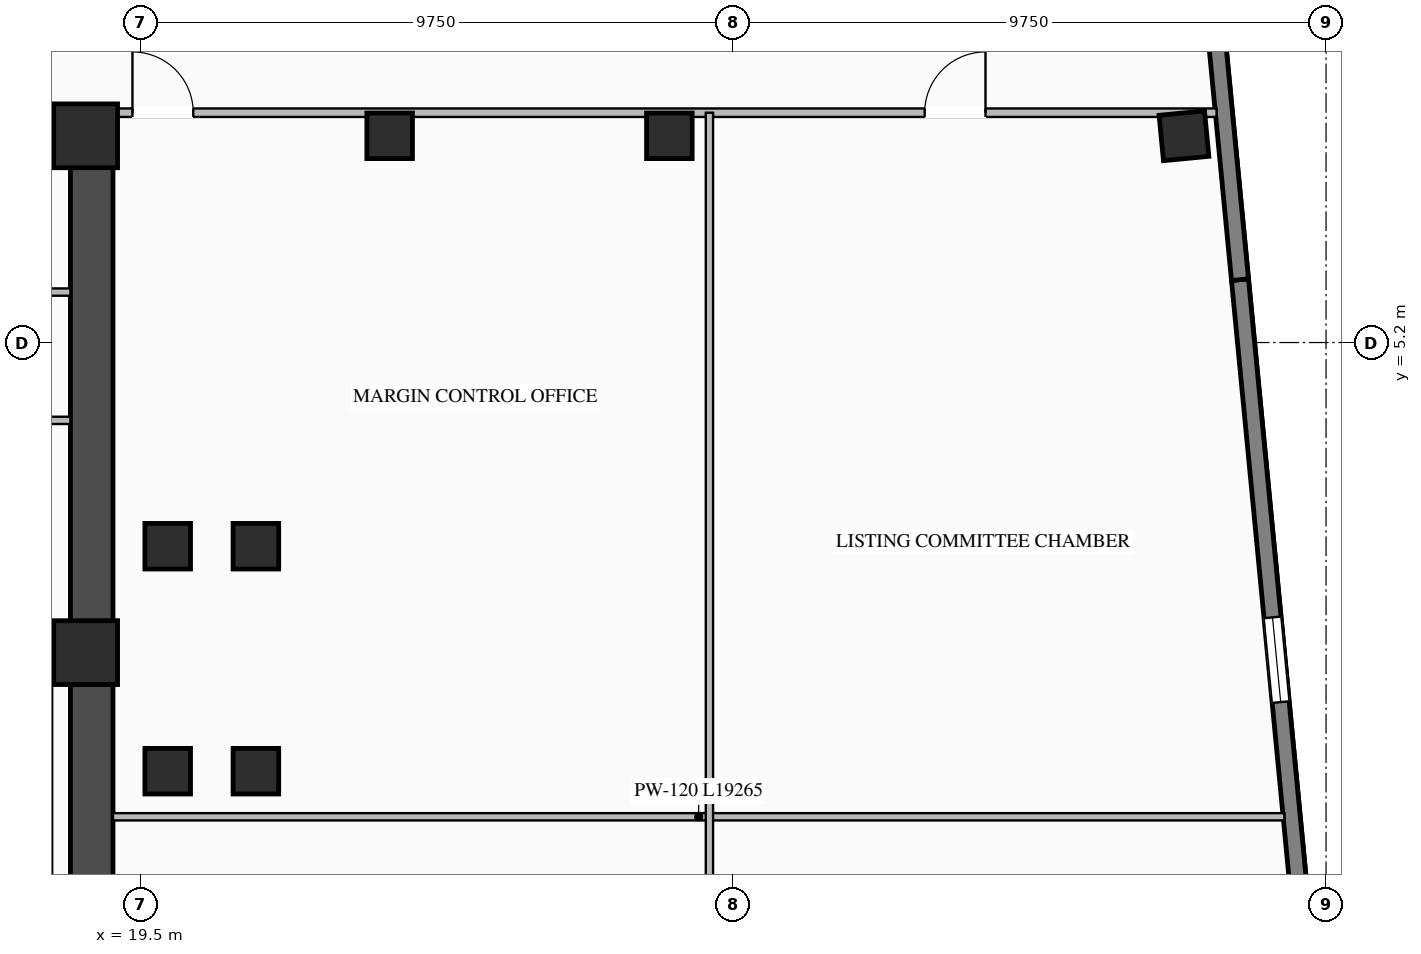
"""IFC4 building model, lengths in metres.
Left out: names, types, materials, properties, quantities, classifications, styles, units other than length and angle.
Written with IfcOpenShell. Run it as: python <this file> out.ifc"""

import sys

from ifc_helpers import new_model, si_unit, direction, frame, frame_2d, origin, origin_2d, place, context, subcontext, project, spatial, rectangle, i_section, extrude, element, fill, save


model = new_model("IFC4")
c1 = context("Model", 3, precision=1e-05, world=origin(), true_north=direction((0.0, 1.0)))
c2 = subcontext(c1, "Body", "Model", "MODEL_VIEW")
j1 = project(units=[si_unit("LENGTHUNIT", "METRE"), si_unit("PLANEANGLEUNIT", "RADIAN")], contexts=[c1])
p1 = place(None, origin())
s1 = spatial("IfcSite", under=j1, at=p1, CompositionType="ELEMENT")
p2 = place(p1, origin())
s2 = spatial("IfcBuilding", under=s1, at=p2, CompositionType="ELEMENT")
p3 = place(p2, frame((0.0, 0.0, 101.8)))
s3 = spatial("IfcBuildingStorey", under=s2, at=p3, CompositionType="ELEMENT", Elevation=101.8)
p4 = place(p3, frame((8.8, 8.7, 0.0), z_axis=(0.0, 0.0, 1.0), x_axis=(1.0, 0.0, 0.0)))
e1 = element("IfcWall", 1, at=p4, inside=s3, PredefinedType="SHEAR", context=c2, shape_type="SweptSolid", body=[
    extrude(rectangle(XDim=10.25, YDim=0.7, at=frame_2d((5.125, 0.0))), origin(), (0.0, 0.0, 1.0), 3.27),
])
p5 = place(p4, frame((3.25, 0.0, 0.0)))
e2 = element("IfcOpeningElement", 2, at=p5, cuts=e1, PredefinedType="OPENING", context=c2, shape_type="SweptSolid", body=[
    extrude(rectangle(XDim=1.4, YDim=2.05, at=frame_2d((0.7, 1.025))), frame((0.0, 0.36, 0.0), z_axis=(0.0, -1.0, 0.0), x_axis=(1.0, 0.0, 0.0)), (0.0, 0.0, 1.0), 0.72),
])
p6 = place(p3, frame((18.7, -8.35, 0.0), z_axis=(0.0, 0.0, 1.0), x_axis=(0.0, 1.0, 0.0)))
e3 = element("IfcWall", 3, at=p6, inside=s3, PredefinedType="SHEAR", context=c2, shape_type="SweptSolid", body=[
    extrude(rectangle(XDim=16.7, YDim=0.7, at=frame_2d((8.35, 0.0))), origin(), (0.0, 0.0, 1.0), 3.27),
])
for number, where, z_axis, x_axis in (
    (4, (18.6, 0.1, 0.0), (0.0, 0.0, 1.0), (1.0, 0.0, 0.0)),
    (5, (18.6, 8.6, 0.0), (0.0, 0.0, 1.0), (1.0, 0.0, 0.0)),
):
    element("IfcColumn", number, at=place(p3, frame(where, z_axis=z_axis, x_axis=x_axis)), inside=s3, PredefinedType="COLUMN", context=c2, shape_type="SweptSolid", body=[
        extrude(rectangle(XDim=1.05, YDim=1.05, at=origin_2d()), origin(), (0.0, 0.0, 1.0), 3.45),
    ])
for number, where, z_axis, x_axis in (
    (6, (19.95, -1.85, 0.0), (0.0, 0.0, 1.0), (1.0, 0.0, 0.0)),
    (7, (19.95, 1.85, 0.0), (0.0, 0.0, 1.0), (1.0, 0.0, 0.0)),
    (8, (21.4, -1.85, 0.0), (0.0, 0.0, 1.0), (1.0, 0.0, 0.0)),
    (9, (21.4, 1.85, 0.0), (0.0, 0.0, 1.0), (1.0, 0.0, 0.0)),
    (10, (23.6, 8.6, 0.0), (0.0, 0.0, 1.0), (1.0, 0.0, 0.0)),
    (11, (28.2, 8.6, 0.0), (0.0, 0.0, 1.0), (1.0, 0.0, 0.0)),
    (12, (36.664, 8.6, 0.0), (0.0, 0.0, 1.0), (0.995, 0.096, 0.0)),
):
    element("IfcColumn", number, at=place(p3, frame(where, z_axis=z_axis, x_axis=x_axis)), inside=s3, PredefinedType="COLUMN", context=c2, shape_type="SweptSolid", body=[
        extrude(i_section(OverallWidth=0.75, OverallDepth=0.75, WebThickness=0.03, FlangeThickness=0.044, at=origin_2d()), origin(), (0.0, 0.0, 1.0), 3.45),
    ])
p7 = place(p3, frame((37.585, 6.234, 0.0), z_axis=(0.0, 0.0, 1.0), x_axis=(0.095841297881, -0.99539662729, 0.0)))
e13 = element("IfcWall", 13, at=p7, inside=s3, PredefinedType="STANDARD", context=c2, shape_type="SweptSolid", body=[
    extrude(rectangle(XDim=18.84, YDim=0.28, at=frame_2d((9.42, 0.0))), origin(), (0.0, 0.0, 1.0), 3.25),
])
p8 = place(p7, frame((5.58, 0.0, 0.76)))
e14 = element("IfcOpeningElement", 14, at=p8, cuts=e13, PredefinedType="OPENING", context=c2, shape_type="SweptSolid", body=[
    extrude(rectangle(XDim=1.4, YDim=1.95, at=frame_2d((0.7, 0.975))), frame((0.0, 0.15, 0.0), z_axis=(0.0, -1.0, 0.0), x_axis=(1.0, 0.0, 0.0)), (0.0, 0.0, 1.0), 0.3),
])
p9 = place(p7, frame((11.86, 0.0, 0.76)))
e15 = element("IfcOpeningElement", 15, at=p9, cuts=e13, PredefinedType="OPENING", context=c2, shape_type="SweptSolid", body=[
    extrude(rectangle(XDim=1.4, YDim=1.95, at=frame_2d((0.7, 0.975))), frame((0.0, 0.15, 0.0), z_axis=(0.0, -1.0, 0.0), x_axis=(1.0, 0.0, 0.0)), (0.0, 0.0, 1.0), 0.3),
])
p10 = place(p3, frame((35.779, 24.987, 0.0), z_axis=(0.0, 0.0, 1.0), x_axis=(0.095842534142, -0.995396508256, 0.0)))
e16 = element("IfcWall", 16, at=p10, inside=s3, PredefinedType="STANDARD", context=c2, shape_type="SweptSolid", body=[
    extrude(rectangle(XDim=18.84, YDim=0.28, at=frame_2d((9.42, 0.0))), origin(), (0.0, 0.0, 1.0), 3.25),
])
p11 = place(p10, frame((5.58, 0.0, 0.76)))
e17 = element("IfcOpeningElement", 17, at=p11, cuts=e16, PredefinedType="OPENING", context=c2, shape_type="SweptSolid", body=[
    extrude(rectangle(XDim=1.4, YDim=1.95, at=frame_2d((0.7, 0.975))), frame((0.0, 0.15, 0.0), z_axis=(0.0, -1.0, 0.0), x_axis=(1.0, 0.0, 0.0)), (0.0, 0.0, 1.0), 0.3),
])
p12 = place(p10, frame((11.31, 0.0, 0.76)))
e18 = element("IfcOpeningElement", 18, at=p12, cuts=e16, PredefinedType="OPENING", context=c2, shape_type="SweptSolid", body=[
    extrude(rectangle(XDim=1.4, YDim=1.95, at=frame_2d((0.7, 0.975))), frame((0.0, 0.15, 0.0), z_axis=(0.0, -1.0, 0.0), x_axis=(1.0, 0.0, 0.0)), (0.0, 0.0, 1.0), 0.3),
])
p13 = place(p3, frame((13.9, 3.92, 0.0), z_axis=(0.0, 0.0, 1.0), x_axis=(1.0, 0.0, 0.0)))
e19 = element("IfcWall", 19, at=p13, inside=s3, PredefinedType="STANDARD", context=c2, shape_type="SweptSolid", body=[
    extrude(rectangle(XDim=4.45, YDim=0.12, at=frame_2d((2.225, 0.0))), origin(), (0.0, 0.0, 1.0), 3.25),
])
p14 = place(p3, frame((16.15, 6.03, 0.0), z_axis=(0.0, 0.0, 1.0), x_axis=(1.0, 0.0, 0.0)))
e20 = element("IfcWall", 20, at=p14, inside=s3, PredefinedType="STANDARD", context=c2, shape_type="SweptSolid", body=[
    extrude(rectangle(XDim=2.2, YDim=0.12, at=frame_2d((1.1, 0.0))), origin(), (0.0, 0.0, 1.0), 3.25),
])
p15 = place(p3, frame((19.05, 8.98, 0.0), z_axis=(0.0, 0.0, 1.0), x_axis=(1.0, 0.0, 0.0)))
e21 = element("IfcWall", 21, at=p15, inside=s3, PredefinedType="STANDARD", context=c2, shape_type="SweptSolid", body=[
    extrude(rectangle(XDim=18.15, YDim=0.14, at=frame_2d((9.075, 0.0))), origin(), (0.0, 0.0, 1.0), 3.25),
])
p16 = place(p15, frame((0.32, 0.0, 0.0)))
e22 = element("IfcOpeningElement", 22, at=p16, cuts=e21, PredefinedType="OPENING", context=c2, shape_type="SweptSolid", body=[
    extrude(rectangle(XDim=1.0, YDim=2.08, at=frame_2d((0.5, 1.04))), frame((0.0, 0.08, 0.0), z_axis=(0.0, -1.0, 0.0), x_axis=(1.0, 0.0, 0.0)), (0.0, 0.0, 1.0), 0.16),
])
p17 = place(p15, frame((13.349, 0.0, 0.0)))
e23 = element("IfcOpeningElement", 23, at=p17, cuts=e21, PredefinedType="OPENING", context=c2, shape_type="SweptSolid", body=[
    extrude(rectangle(XDim=1.0, YDim=2.08, at=frame_2d((0.5, 1.04))), frame((0.0, 0.08, 0.0), z_axis=(0.0, -1.0, 0.0), x_axis=(1.0, 0.0, 0.0)), (0.0, 0.0, 1.0), 0.16),
])
p18 = place(p3, frame((19.05, -2.6, 0.0), z_axis=(0.0, 0.0, 1.0), x_axis=(1.0, 0.0, 0.0)))
e24 = element("IfcWall", 24, at=p18, inside=s3, PredefinedType="STANDARD", context=c2, shape_type="SweptSolid", body=[
    extrude(rectangle(XDim=19.265, YDim=0.12, at=frame_2d((9.632, 0.0))), origin(), (0.0, 0.0, 1.0), 3.25),
])
p19 = place(p3, frame((28.859, -8.98, 0.0), z_axis=(0.0, 0.0, 1.0), x_axis=(0.0, 1.0, 0.0)))
e25 = element("IfcWall", 25, at=p19, inside=s3, PredefinedType="STANDARD", context=c2, shape_type="SweptSolid", body=[
    extrude(rectangle(XDim=17.96, YDim=0.12, at=frame_2d((8.98, 0.0))), origin(), (0.0, 0.0, 1.0), 3.25),
])
p20 = place(p8, origin())
e26 = element("IfcWindow", 26, at=p20, inside=s3, PartitioningType="SINGLE_PANEL", PredefinedType="WINDOW", context=c2, shape_type="SweptSolid", body=[
    extrude(rectangle(XDim=1.4, YDim=1.95, at=frame_2d((0.7, 0.975))), frame((0.0, 0.03, 0.0), z_axis=(0.0, -1.0, 0.0), x_axis=(1.0, 0.0, 0.0)), (0.0, 0.0, 1.0), 0.06),
])
fill(e14, e26)
p21 = place(p16, origin())
e27 = element("IfcDoor", 27, at=p21, inside=s3, OperationType="SINGLE_SWING_LEFT", PredefinedType="DOOR", context=c2, shape_type="SweptSolid", body=[
    extrude(rectangle(XDim=1.0, YDim=2.08, at=frame_2d((0.5, 1.04))), frame((0.0, 0.025, 0.0), z_axis=(0.0, -1.0, 0.0), x_axis=(1.0, 0.0, 0.0)), (0.0, 0.0, 1.0), 0.05),
])
fill(e22, e27)
p22 = place(p17, origin())
e28 = element("IfcDoor", 28, at=p22, inside=s3, OperationType="SINGLE_SWING_RIGHT", PredefinedType="DOOR", context=c2, shape_type="SweptSolid", body=[
    extrude(rectangle(XDim=1.0, YDim=2.08, at=frame_2d((0.5, 1.04))), frame((0.0, 0.025, 0.0), z_axis=(0.0, -1.0, 0.0), x_axis=(1.0, 0.0, 0.0)), (0.0, 0.0, 1.0), 0.05),
])
fill(e23, e28)
save(model, sys.argv[1])
